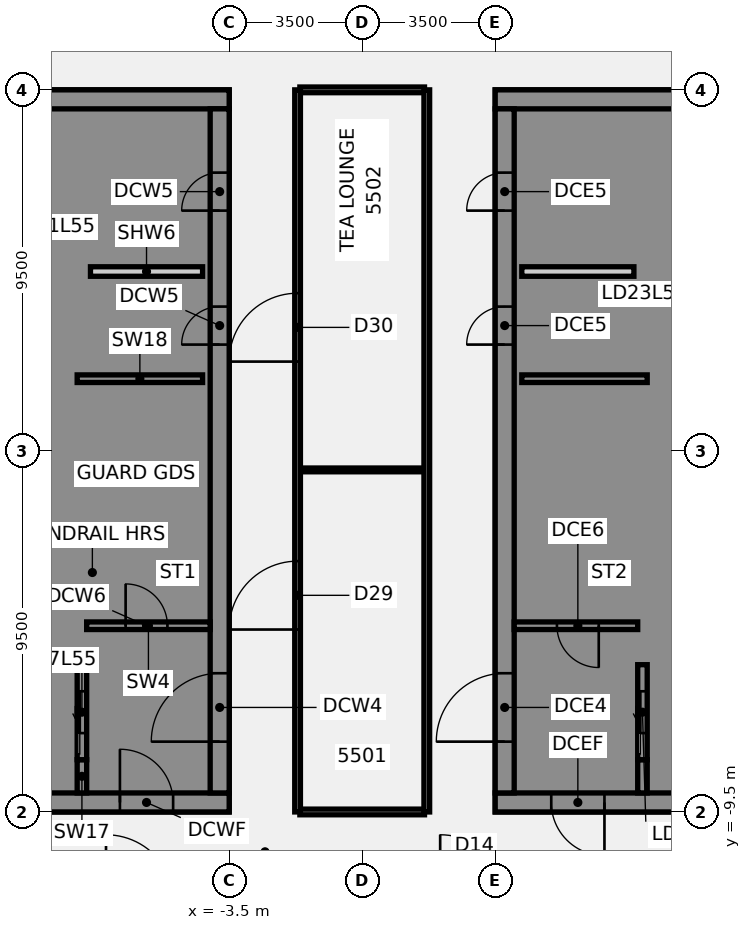
"""IFC4 building model, lengths in metres.
Left out: names, types, materials, properties, quantities, classifications, styles, units other than length and angle.
Written with IfcOpenShell. Run it as: python <this file> out.ifc"""

import sys

from ifc_helpers import new_model, si_unit, direction, frame, frame_2d, origin, place, context, subcontext, project, spatial, polyline, rectangle, outline, extrude, element, fill, save


model = new_model("IFC4")
c1 = context("Model", 3, precision=1e-05, world=origin(), true_north=direction((0.0, 1.0)))
c2 = subcontext(c1, "Body", "Model", "MODEL_VIEW")
j1 = project(units=[si_unit("LENGTHUNIT", "METRE"), si_unit("PLANEANGLEUNIT", "RADIAN")], contexts=[c1])
p1 = place(None, origin())
s1 = spatial("IfcSite", under=j1, at=p1, CompositionType="ELEMENT")
p2 = place(p1, origin())
s2 = spatial("IfcBuilding", under=s1, at=p2, CompositionType="ELEMENT")
p3 = place(p2, frame((0.0, 0.0, 219.9)))
s3 = spatial("IfcBuildingStorey", under=s2, at=p3, CompositionType="ELEMENT", Elevation=219.9)
p4 = place(p3, frame((-1.64, -9.5, 0.0), z_axis=(0.0, 0.0, 1.0), x_axis=(1.0, 0.0, 0.0)))
e1 = element("IfcWall", 1, at=p4, inside=s3, PredefinedType="PARTITIONING", context=c2, shape_type="SweptSolid", body=[
    extrude(rectangle(XDim=3.28, YDim=0.15, at=frame_2d((1.64, 0.0))), origin(), (0.0, 0.0, 1.0), 2.864),
])
p5 = place(p3, frame((-1.64, -0.5, 0.0), z_axis=(0.0, 0.0, 1.0), x_axis=(1.0, 0.0, 0.0)))
e2 = element("IfcWall", 2, at=p5, inside=s3, PredefinedType="PARTITIONING", context=c2, shape_type="SweptSolid", body=[
    extrude(rectangle(XDim=3.28, YDim=0.1, at=frame_2d((1.64, 0.0))), origin(), (0.0, 0.0, 1.0), 2.864),
])
p6 = place(p3, frame((-1.64, 9.5, 0.0), z_axis=(0.0, 0.0, 1.0), x_axis=(1.0, 0.0, 0.0)))
e3 = element("IfcWall", 3, at=p6, inside=s3, PredefinedType="PARTITIONING", context=c2, shape_type="SweptSolid", body=[
    extrude(rectangle(XDim=3.28, YDim=0.15, at=frame_2d((1.64, 0.0))), origin(), (0.0, 0.0, 1.0), 2.864),
])
p7 = place(p3, frame((-1.7, -9.5, 0.0), z_axis=(0.0, 0.0, 1.0), x_axis=(0.0, 1.0, 0.0)))
e4 = element("IfcWall", 4, at=p7, inside=s3, PredefinedType="PARTITIONING", context=c2, shape_type="SweptSolid", body=[
    extrude(rectangle(XDim=19.0, YDim=0.15, at=frame_2d((9.5, 0.0))), origin(), (0.0, 0.0, 1.0), 2.864),
])
p8 = place(p7, frame((4.8, 0.0, 0.0)))
e5 = element("IfcOpeningElement", 5, at=p8, cuts=e4, PredefinedType="OPENING", context=c2, shape_type="SweptSolid", body=[
    extrude(rectangle(XDim=1.8, YDim=2.1, at=frame_2d((0.9, 1.05))), frame((0.0, 0.085, 0.0), z_axis=(0.0, -1.0, 0.0), x_axis=(1.0, 0.0, 0.0)), (0.0, 0.0, 1.0), 0.17),
])
p9 = place(p7, frame((11.85, 0.0, 0.0)))
e6 = element("IfcOpeningElement", 6, at=p9, cuts=e4, PredefinedType="OPENING", context=c2, shape_type="SweptSolid", body=[
    extrude(rectangle(XDim=1.8, YDim=2.1, at=frame_2d((0.9, 1.05))), frame((0.0, 0.085, 0.0), z_axis=(0.0, -1.0, 0.0), x_axis=(1.0, 0.0, 0.0)), (0.0, 0.0, 1.0), 0.17),
])
p10 = place(p3, frame((1.7, -9.5, 0.0), z_axis=(0.0, 0.0, 1.0), x_axis=(0.0, 1.0, 0.0)))
e7 = element("IfcWall", 7, at=p10, inside=s3, PredefinedType="PARTITIONING", context=c2, shape_type="SweptSolid", body=[
    extrude(rectangle(XDim=19.0, YDim=0.15, at=frame_2d((9.5, 0.0))), origin(), (0.0, 0.0, 1.0), 2.864),
])
p11 = place(p3, frame((-16.5, -9.25, 0.0), z_axis=(0.0, 0.0, 1.0), x_axis=(1.0, 0.0, 0.0)))
e8 = element("IfcWall", 8, at=p11, inside=s3, PredefinedType="SHEAR", context=c2, shape_type="SweptSolid", body=[
    extrude(rectangle(XDim=13.0, YDim=0.5, at=frame_2d((6.5, 0.0))), origin(), (0.0, 0.0, 1.0), 3.46),
])
p12 = place(p11, frame((4.15, 0.0, 0.0)))
e9 = element("IfcOpeningElement", 9, at=p12, cuts=e8, PredefinedType="OPENING", context=c2, shape_type="SweptSolid", body=[
    extrude(rectangle(XDim=1.4, YDim=2.1, at=frame_2d((0.7, 1.05))), frame((0.0, 0.26, 0.0), z_axis=(0.0, -1.0, 0.0), x_axis=(1.0, 0.0, 0.0)), (0.0, 0.0, 1.0), 0.52),
])
p13 = place(p11, frame((10.125, 0.0, 0.0)))
e10 = element("IfcOpeningElement", 10, at=p13, cuts=e8, PredefinedType="OPENING", context=c2, shape_type="SweptSolid", body=[
    extrude(rectangle(XDim=1.4, YDim=2.1, at=frame_2d((0.7, 1.05))), frame((0.0, 0.26, 0.0), z_axis=(0.0, -1.0, 0.0), x_axis=(1.0, 0.0, 0.0)), (0.0, 0.0, 1.0), 0.52),
])
p14 = place(p3, frame((-16.5, 9.25, 0.0), z_axis=(0.0, 0.0, 1.0), x_axis=(1.0, 0.0, 0.0)))
e11 = element("IfcWall", 11, at=p14, inside=s3, PredefinedType="SHEAR", context=c2, shape_type="SweptSolid", body=[
    extrude(rectangle(XDim=13.0, YDim=0.5, at=frame_2d((6.5, 0.0))), origin(), (0.0, 0.0, 1.0), 3.46),
])
p15 = place(p3, origin())
e12 = element("IfcWall", 12, at=p15, inside=s3, PredefinedType="SHEAR", context=c2, shape_type="SweptSolid", body=[
    extrude(outline(polyline([(-9.8, -5.375), (-9.8, -5.625), (-7.5, -5.625), (-7.25, -5.625), (-7.25, 9.0), (-7.5, 9.0), (-9.8, 9.0), (-9.8, 8.125), (-7.5, 8.125), (-7.5, 5.625), (-9.8, 5.625), (-9.8, 5.375), (-7.5, 5.375), (-7.5, 2.875), (-9.8, 2.875), (-9.8, 2.625), (-7.5, 2.625), (-7.5, 0.125), (-9.8, 0.125), (-9.8, -0.125), (-7.5, -0.125), (-7.5, -2.625), (-9.8, -2.625), (-9.8, -2.875), (-7.5, -2.875), (-7.5, -5.375), (-9.8, -5.375)])), origin(), (0.0, 0.0, 1.0), 3.46),
])
p16 = place(p3, origin())
e13 = element("IfcWall", 13, at=p16, inside=s3, PredefinedType="SHEAR", context=c2, shape_type="SweptSolid", body=[
    extrude(outline(polyline([(-7.5, -8.125), (-9.55, -8.125), (-9.55, -5.625), (-9.8, -5.625), (-9.8, -8.125), (-9.8, -9.0), (-7.5, -9.0), (-7.5, -8.125)])), origin(), (0.0, 0.0, 1.0), 3.46),
])
p17 = place(p3, frame((-7.375, -9.0, 0.0), z_axis=(0.0, 0.0, 1.0), x_axis=(0.0, 1.0, 0.0)))
e14 = element("IfcWall", 14, at=p17, inside=s3, PredefinedType="SHEAR", context=c2, shape_type="SweptSolid", body=[
    extrude(rectangle(XDim=0.875, YDim=0.25, at=frame_2d((0.438, 0.0))), origin(), (0.0, 0.0, 1.0), 3.46),
])
p18 = place(p3, frame((-7.5, 1.9, 0.0), z_axis=(0.0, 0.0, 1.0), x_axis=(1.0, 0.0, 0.0)))
e15 = element("IfcWall", 15, at=p18, inside=s3, PredefinedType="SHEAR", context=c2, shape_type="SweptSolid", body=[
    extrude(rectangle(XDim=3.3, YDim=0.2, at=frame_2d((1.65, 0.0))), origin(), (0.0, 0.0, 1.0), 3.46),
])
p19 = place(p3, frame((-7.375, -8.125, 0.0), z_axis=(0.0, 0.0, 1.0), x_axis=(0.0, 1.0, 0.0)))
e16 = element("IfcWall", 16, at=p19, inside=s3, PredefinedType="SHEAR", context=c2, shape_type="SweptSolid", body=[
    extrude(rectangle(XDim=2.5, YDim=0.25, at=frame_2d((1.25, 0.0))), origin(), (0.0, 0.0, 1.0), 3.46),
])
p20 = place(p19, frame((0.7, 0.0, 0.0)))
e17 = element("IfcOpeningElement", 17, at=p20, cuts=e16, PredefinedType="OPENING", context=c2, shape_type="SweptSolid", body=[
    extrude(rectangle(XDim=1.1, YDim=2.1, at=frame_2d((0.55, 1.05))), frame((0.0, 0.135, 0.0), z_axis=(0.0, -1.0, 0.0), x_axis=(1.0, 0.0, 0.0)), (0.0, 0.0, 1.0), 0.27),
])
p21 = place(p3, frame((-3.75, -9.0, 0.0), z_axis=(0.0, 0.0, 1.0), x_axis=(0.0, 1.0, 0.0)))
e18 = element("IfcWall", 18, at=p21, inside=s3, PredefinedType="SHEAR", context=c2, shape_type="SweptSolid", body=[
    extrude(rectangle(XDim=18.0, YDim=0.5, at=frame_2d((9.0, 0.0))), origin(), (0.0, 0.0, 1.0), 3.46),
])
p22 = place(p21, frame((1.35, 0.0, 0.0)))
e19 = element("IfcOpeningElement", 19, at=p22, cuts=e18, PredefinedType="OPENING", context=c2, shape_type="SweptSolid", body=[
    extrude(rectangle(XDim=1.8, YDim=2.1, at=frame_2d((0.9, 1.05))), frame((0.0, 0.26, 0.0), z_axis=(0.0, -1.0, 0.0), x_axis=(1.0, 0.0, 0.0)), (0.0, 0.0, 1.0), 0.52),
])
p23 = place(p21, frame((11.798, 0.0, 0.0)))
e20 = element("IfcOpeningElement", 20, at=p23, cuts=e18, PredefinedType="OPENING", context=c2, shape_type="SweptSolid", body=[
    extrude(rectangle(XDim=1.0, YDim=2.1, at=frame_2d((0.5, 1.05))), frame((0.0, 0.26, 0.0), z_axis=(0.0, -1.0, 0.0), x_axis=(1.0, 0.0, 0.0)), (0.0, 0.0, 1.0), 0.52),
])
p24 = place(p21, frame((15.323, 0.0, 0.0)))
e21 = element("IfcOpeningElement", 21, at=p24, cuts=e18, PredefinedType="OPENING", context=c2, shape_type="SweptSolid", body=[
    extrude(rectangle(XDim=1.0, YDim=2.1, at=frame_2d((0.5, 1.05))), frame((0.0, 0.26, 0.0), z_axis=(0.0, -1.0, 0.0), x_axis=(1.0, 0.0, 0.0)), (0.0, 0.0, 1.0), 0.52),
])
p25 = place(p3, frame((-7.15, 4.72, 0.0), z_axis=(0.0, 0.0, 1.0), x_axis=(1.0, 0.0, 0.0)))
e22 = element("IfcWall", 22, at=p25, inside=s3, PredefinedType="PARTITIONING", context=c2, shape_type="SweptSolid", body=[
    extrude(rectangle(XDim=2.95, YDim=0.25, at=frame_2d((1.475, 0.0))), origin(), (0.0, 0.0, 1.0), 3.46),
])
p26 = place(p3, frame((-7.25, -4.6, 0.0), z_axis=(0.0, 0.0, 1.0), x_axis=(1.0, 0.0, 0.0)))
e23 = element("IfcWall", 23, at=p26, inside=s3, PredefinedType="SHEAR", context=c2, shape_type="SweptSolid", body=[
    extrude(rectangle(XDim=3.25, YDim=0.2, at=frame_2d((1.625, 0.0))), origin(), (0.0, 0.0, 1.0), 3.46),
])
p27 = place(p26, frame((1.025, 0.0, 0.0)))
e24 = element("IfcOpeningElement", 24, at=p27, cuts=e23, PredefinedType="OPENING", context=c2, shape_type="SweptSolid", body=[
    extrude(rectangle(XDim=1.1, YDim=2.1, at=frame_2d((0.55, 1.05))), frame((0.0, 0.11, 0.0), z_axis=(0.0, -1.0, 0.0), x_axis=(1.0, 0.0, 0.0)), (0.0, 0.0, 1.0), 0.22),
])
p28 = place(p3, frame((16.5, -9.25, 0.0), z_axis=(0.0, 0.0, 1.0), x_axis=(-1.0, 0.0, 0.0)))
e25 = element("IfcWall", 25, at=p28, inside=s3, PredefinedType="SHEAR", context=c2, shape_type="SweptSolid", body=[
    extrude(rectangle(XDim=13.0, YDim=0.5, at=frame_2d((6.5, 0.0))), origin(), (0.0, 0.0, 1.0), 3.46),
])
p29 = place(p28, frame((4.15, 0.0, 0.0)))
e26 = element("IfcOpeningElement", 26, at=p29, cuts=e25, PredefinedType="OPENING", context=c2, shape_type="SweptSolid", body=[
    extrude(rectangle(XDim=1.4, YDim=2.1, at=frame_2d((0.7, 1.05))), frame((0.0, 0.26, 0.0), z_axis=(0.0, -1.0, 0.0), x_axis=(1.0, 0.0, 0.0)), (0.0, 0.0, 1.0), 0.52),
])
p30 = place(p28, frame((10.125, 0.0, 0.0)))
e27 = element("IfcOpeningElement", 27, at=p30, cuts=e25, PredefinedType="OPENING", context=c2, shape_type="SweptSolid", body=[
    extrude(rectangle(XDim=1.4, YDim=2.1, at=frame_2d((0.7, 1.05))), frame((0.0, 0.26, 0.0), z_axis=(0.0, -1.0, 0.0), x_axis=(1.0, 0.0, 0.0)), (0.0, 0.0, 1.0), 0.52),
])
p31 = place(p3, frame((16.5, 9.25, 0.0), z_axis=(0.0, 0.0, 1.0), x_axis=(-1.0, 0.0, 0.0)))
e28 = element("IfcWall", 28, at=p31, inside=s3, PredefinedType="SHEAR", context=c2, shape_type="SweptSolid", body=[
    extrude(rectangle(XDim=13.0, YDim=0.5, at=frame_2d((6.5, 0.0))), origin(), (0.0, 0.0, 1.0), 3.46),
])
p32 = place(p3, origin())
e29 = element("IfcWall", 29, at=p32, inside=s3, PredefinedType="SHEAR", context=c2, shape_type="SweptSolid", body=[
    extrude(outline(polyline([(9.8, -5.375), (7.5, -5.375), (7.5, -2.875), (9.8, -2.875), (9.8, -2.625), (7.5, -2.625), (7.5, -0.125), (9.8, -0.125), (9.8, 0.125), (7.5, 0.125), (7.5, 2.625), (9.8, 2.625), (9.8, 2.875), (7.5, 2.875), (7.5, 5.375), (9.8, 5.375), (9.8, 5.625), (7.5, 5.625), (7.5, 8.125), (9.8, 8.125), (9.8, 9.0), (7.5, 9.0), (7.25, 9.0), (7.25, -5.625), (7.5, -5.625), (9.8, -5.625), (9.8, -5.375)])), origin(), (0.0, 0.0, 1.0), 3.46),
])
p33 = place(p3, origin())
e30 = element("IfcWall", 30, at=p33, inside=s3, PredefinedType="SHEAR", context=c2, shape_type="SweptSolid", body=[
    extrude(outline(polyline([(7.5, -8.125), (7.5, -9.0), (9.8, -9.0), (9.8, -8.125), (9.8, -5.625), (9.55, -5.625), (9.55, -8.125), (7.5, -8.125)])), origin(), (0.0, 0.0, 1.0), 3.46),
])
p34 = place(p3, frame((7.375, -9.0, 0.0), z_axis=(0.0, 0.0, 1.0), x_axis=(0.0, 1.0, 0.0)))
e31 = element("IfcWall", 31, at=p34, inside=s3, PredefinedType="SHEAR", context=c2, shape_type="SweptSolid", body=[
    extrude(rectangle(XDim=0.875, YDim=0.25, at=frame_2d((0.438, 0.0))), origin(), (0.0, 0.0, 1.0), 3.46),
])
p35 = place(p3, frame((7.5, 1.9, 0.0), z_axis=(0.0, 0.0, 1.0), x_axis=(-1.0, 0.0, 0.0)))
e32 = element("IfcWall", 32, at=p35, inside=s3, PredefinedType="SHEAR", context=c2, shape_type="SweptSolid", body=[
    extrude(rectangle(XDim=3.3, YDim=0.2, at=frame_2d((1.65, 0.0))), origin(), (0.0, 0.0, 1.0), 3.46),
])
p36 = place(p3, frame((7.375, -8.125, 0.0), z_axis=(0.0, 0.0, 1.0), x_axis=(0.0, 1.0, 0.0)))
e33 = element("IfcWall", 33, at=p36, inside=s3, PredefinedType="SHEAR", context=c2, shape_type="SweptSolid", body=[
    extrude(rectangle(XDim=2.5, YDim=0.25, at=frame_2d((1.25, 0.0))), origin(), (0.0, 0.0, 1.0), 3.46),
])
p37 = place(p36, frame((0.7, 0.0, 0.0)))
e34 = element("IfcOpeningElement", 34, at=p37, cuts=e33, PredefinedType="OPENING", context=c2, shape_type="SweptSolid", body=[
    extrude(rectangle(XDim=1.1, YDim=2.1, at=frame_2d((0.55, 1.05))), frame((0.0, 0.135, 0.0), z_axis=(0.0, -1.0, 0.0), x_axis=(1.0, 0.0, 0.0)), (0.0, 0.0, 1.0), 0.27),
])
p38 = place(p3, frame((3.75, -9.0, 0.0), z_axis=(0.0, 0.0, 1.0), x_axis=(0.0, 1.0, 0.0)))
e35 = element("IfcWall", 35, at=p38, inside=s3, PredefinedType="SHEAR", context=c2, shape_type="SweptSolid", body=[
    extrude(rectangle(XDim=18.0, YDim=0.5, at=frame_2d((9.0, 0.0))), origin(), (0.0, 0.0, 1.0), 3.46),
])
p39 = place(p38, frame((1.35, 0.0, 0.0)))
e36 = element("IfcOpeningElement", 36, at=p39, cuts=e35, PredefinedType="OPENING", context=c2, shape_type="SweptSolid", body=[
    extrude(rectangle(XDim=1.8, YDim=2.1, at=frame_2d((0.9, 1.05))), frame((0.0, 0.26, 0.0), z_axis=(0.0, -1.0, 0.0), x_axis=(1.0, 0.0, 0.0)), (0.0, 0.0, 1.0), 0.52),
])
p40 = place(p38, frame((11.798, 0.0, 0.0)))
e37 = element("IfcOpeningElement", 37, at=p40, cuts=e35, PredefinedType="OPENING", context=c2, shape_type="SweptSolid", body=[
    extrude(rectangle(XDim=1.0, YDim=2.1, at=frame_2d((0.5, 1.05))), frame((0.0, 0.26, 0.0), z_axis=(0.0, -1.0, 0.0), x_axis=(1.0, 0.0, 0.0)), (0.0, 0.0, 1.0), 0.52),
])
p41 = place(p38, frame((15.323, 0.0, 0.0)))
e38 = element("IfcOpeningElement", 38, at=p41, cuts=e35, PredefinedType="OPENING", context=c2, shape_type="SweptSolid", body=[
    extrude(rectangle(XDim=1.0, YDim=2.1, at=frame_2d((0.5, 1.05))), frame((0.0, 0.26, 0.0), z_axis=(0.0, -1.0, 0.0), x_axis=(1.0, 0.0, 0.0)), (0.0, 0.0, 1.0), 0.52),
])
p42 = place(p3, frame((7.15, 4.72, 0.0), z_axis=(0.0, 0.0, 1.0), x_axis=(-1.0, 0.0, 0.0)))
e39 = element("IfcWall", 39, at=p42, inside=s3, PredefinedType="PARTITIONING", context=c2, shape_type="SweptSolid", body=[
    extrude(rectangle(XDim=2.95, YDim=0.25, at=frame_2d((1.475, 0.0))), origin(), (0.0, 0.0, 1.0), 3.46),
])
p43 = place(p3, frame((7.25, -4.6, 0.0), z_axis=(0.0, 0.0, 1.0), x_axis=(-1.0, 0.0, 0.0)))
e40 = element("IfcWall", 40, at=p43, inside=s3, PredefinedType="SHEAR", context=c2, shape_type="SweptSolid", body=[
    extrude(rectangle(XDim=3.25, YDim=0.2, at=frame_2d((1.625, 0.0))), origin(), (0.0, 0.0, 1.0), 3.46),
])
p44 = place(p43, frame((1.025, 0.0, 0.0)))
e41 = element("IfcOpeningElement", 41, at=p44, cuts=e40, PredefinedType="OPENING", context=c2, shape_type="SweptSolid", body=[
    extrude(rectangle(XDim=1.1, YDim=2.1, at=frame_2d((0.55, 1.05))), frame((0.0, 0.11, 0.0), z_axis=(0.0, -1.0, 0.0), x_axis=(1.0, 0.0, 0.0)), (0.0, 0.0, 1.0), 0.22),
])
p45 = place(p8, frame((1.8, 0.0, 0.0), z_axis=(0.0, 0.0, 1.0), x_axis=(-1.0, 0.0, 0.0)))
e42 = element("IfcDoor", 42, at=p45, inside=s3, OperationType="DOUBLE_DOOR_SINGLE_SWING", PredefinedType="DOOR", context=c2, shape_type="SweptSolid", body=[
    extrude(rectangle(XDim=1.8, YDim=2.1, at=frame_2d((0.9, 1.05))), frame((0.0, 0.025, 0.0), z_axis=(0.0, -1.0, 0.0), x_axis=(1.0, 0.0, 0.0)), (0.0, 0.0, 1.0), 0.05),
])
fill(e5, e42)
p46 = place(p9, frame((1.8, 0.0, 0.0), z_axis=(0.0, 0.0, 1.0), x_axis=(-1.0, 0.0, 0.0)))
e43 = element("IfcDoor", 43, at=p46, inside=s3, OperationType="DOUBLE_DOOR_SINGLE_SWING", PredefinedType="DOOR", context=c2, shape_type="SweptSolid", body=[
    extrude(rectangle(XDim=1.8, YDim=2.1, at=frame_2d((0.9, 1.05))), frame((0.0, 0.025, 0.0), z_axis=(0.0, -1.0, 0.0), x_axis=(1.0, 0.0, 0.0)), (0.0, 0.0, 1.0), 0.05),
])
fill(e6, e43)
p47 = place(p13, origin())
e44 = element("IfcDoor", 44, at=p47, inside=s3, OperationType="SINGLE_SWING_LEFT", PredefinedType="DOOR", context=c2, shape_type="SweptSolid", body=[
    extrude(rectangle(XDim=1.4, YDim=2.1, at=frame_2d((0.7, 1.05))), frame((0.0, 0.025, 0.0), z_axis=(0.0, -1.0, 0.0), x_axis=(1.0, 0.0, 0.0)), (0.0, 0.0, 1.0), 0.05),
])
fill(e10, e44)
p48 = place(p22, origin())
e45 = element("IfcDoor", 45, at=p48, inside=s3, OperationType="SINGLE_SWING_LEFT", PredefinedType="DOOR", context=c2, shape_type="SweptSolid", body=[
    extrude(rectangle(XDim=1.8, YDim=2.1, at=frame_2d((0.9, 1.05))), frame((0.0, 0.025, 0.0), z_axis=(0.0, -1.0, 0.0), x_axis=(1.0, 0.0, 0.0)), (0.0, 0.0, 1.0), 0.05),
])
fill(e19, e45)
p49 = place(p23, origin())
e46 = element("IfcDoor", 46, at=p49, inside=s3, OperationType="SINGLE_SWING_LEFT", PredefinedType="DOOR", context=c2, shape_type="SweptSolid", body=[
    extrude(rectangle(XDim=1.0, YDim=2.1, at=frame_2d((0.5, 1.05))), frame((0.0, 0.225, 0.0), z_axis=(0.0, -1.0, 0.0), x_axis=(1.0, 0.0, 0.0)), (0.0, 0.0, 1.0), 0.05),
])
fill(e20, e46)
p50 = place(p24, origin())
e47 = element("IfcDoor", 47, at=p50, inside=s3, OperationType="SINGLE_SWING_LEFT", PredefinedType="DOOR", context=c2, shape_type="SweptSolid", body=[
    extrude(rectangle(XDim=1.0, YDim=2.1, at=frame_2d((0.5, 1.05))), frame((0.0, 0.225, 0.0), z_axis=(0.0, -1.0, 0.0), x_axis=(1.0, 0.0, 0.0)), (0.0, 0.0, 1.0), 0.05),
])
fill(e21, e47)
p51 = place(p27, origin())
e48 = element("IfcDoor", 48, at=p51, inside=s3, OperationType="SINGLE_SWING_LEFT", PredefinedType="DOOR", context=c2, shape_type="SweptSolid", body=[
    extrude(rectangle(XDim=1.1, YDim=2.1, at=frame_2d((0.55, 1.05))), frame((0.0, 0.025, 0.0), z_axis=(0.0, -1.0, 0.0), x_axis=(1.0, 0.0, 0.0)), (0.0, 0.0, 1.0), 0.05),
])
fill(e24, e48)
p52 = place(p20, origin())
e49 = element("IfcDoor", 49, at=p52, inside=s3, OperationType="SLIDING_TO_LEFT", PredefinedType="DOOR", context=c2, shape_type="SweptSolid", body=[
    extrude(rectangle(XDim=1.1, YDim=2.1, at=frame_2d((0.55, 1.05))), frame((0.0, 0.025, 0.0), z_axis=(0.0, -1.0, 0.0), x_axis=(1.0, 0.0, 0.0)), (0.0, 0.0, 1.0), 0.05),
])
fill(e17, e49)
p53 = place(p30, origin())
e50 = element("IfcDoor", 50, at=p53, inside=s3, OperationType="SINGLE_SWING_LEFT", PredefinedType="DOOR", context=c2, shape_type="SweptSolid", body=[
    extrude(rectangle(XDim=1.4, YDim=2.1, at=frame_2d((0.7, 1.05))), frame((0.0, 0.025, 0.0), z_axis=(0.0, -1.0, 0.0), x_axis=(1.0, 0.0, 0.0)), (0.0, 0.0, 1.0), 0.05),
])
fill(e27, e50)
p54 = place(p39, origin())
e51 = element("IfcDoor", 51, at=p54, inside=s3, OperationType="SINGLE_SWING_LEFT", PredefinedType="DOOR", context=c2, shape_type="SweptSolid", body=[
    extrude(rectangle(XDim=1.8, YDim=2.1, at=frame_2d((0.9, 1.05))), frame((0.0, 0.025, 0.0), z_axis=(0.0, -1.0, 0.0), x_axis=(1.0, 0.0, 0.0)), (0.0, 0.0, 1.0), 0.05),
])
fill(e36, e51)
p55 = place(p40, origin())
e52 = element("IfcDoor", 52, at=p55, inside=s3, OperationType="SINGLE_SWING_LEFT", PredefinedType="DOOR", context=c2, shape_type="SweptSolid", body=[
    extrude(rectangle(XDim=1.0, YDim=2.1, at=frame_2d((0.5, 1.05))), frame((0.0, -0.175, 0.0), z_axis=(0.0, -1.0, 0.0), x_axis=(1.0, 0.0, 0.0)), (0.0, 0.0, 1.0), 0.05),
])
fill(e37, e52)
p56 = place(p41, origin())
e53 = element("IfcDoor", 53, at=p56, inside=s3, OperationType="SINGLE_SWING_LEFT", PredefinedType="DOOR", context=c2, shape_type="SweptSolid", body=[
    extrude(rectangle(XDim=1.0, YDim=2.1, at=frame_2d((0.5, 1.05))), frame((0.0, -0.175, 0.0), z_axis=(0.0, -1.0, 0.0), x_axis=(1.0, 0.0, 0.0)), (0.0, 0.0, 1.0), 0.05),
])
fill(e38, e53)
p57 = place(p44, origin())
e54 = element("IfcDoor", 54, at=p57, inside=s3, OperationType="SINGLE_SWING_LEFT", PredefinedType="DOOR", context=c2, shape_type="SweptSolid", body=[
    extrude(rectangle(XDim=1.1, YDim=2.1, at=frame_2d((0.55, 1.05))), frame((0.0, 0.025, 0.0), z_axis=(0.0, -1.0, 0.0), x_axis=(1.0, 0.0, 0.0)), (0.0, 0.0, 1.0), 0.05),
])
fill(e41, e54)
p58 = place(p37, origin())
e55 = element("IfcDoor", 55, at=p58, inside=s3, OperationType="SLIDING_TO_LEFT", PredefinedType="DOOR", context=c2, shape_type="SweptSolid", body=[
    extrude(rectangle(XDim=1.1, YDim=2.1, at=frame_2d((0.55, 1.05))), frame((0.0, 0.025, 0.0), z_axis=(0.0, -1.0, 0.0), x_axis=(1.0, 0.0, 0.0)), (0.0, 0.0, 1.0), 0.05),
])
fill(e34, e55)
save(model, sys.argv[1])
